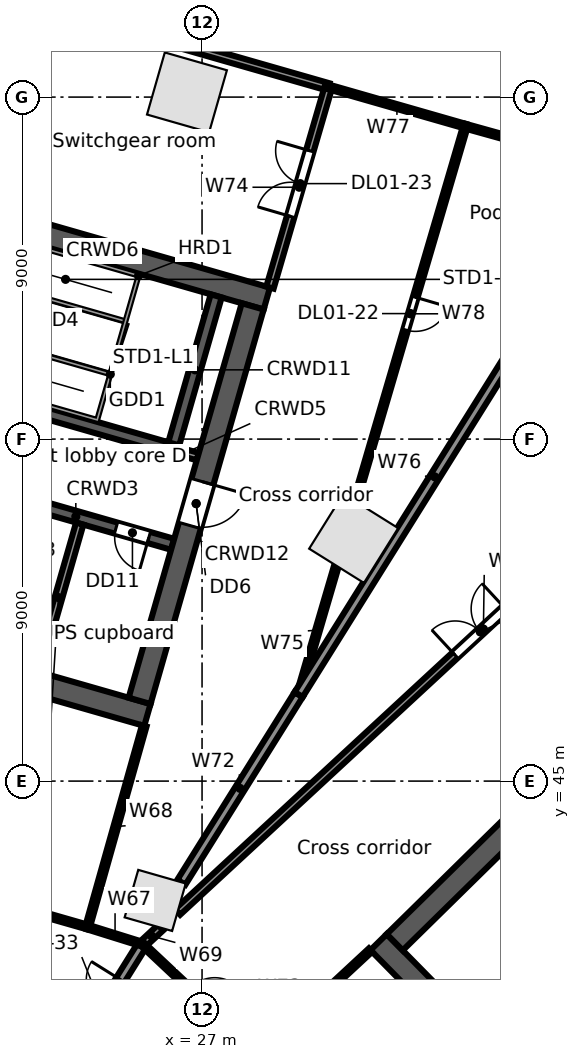
"""IFC4 building model, lengths in metres.
Left out: names, types, materials, properties, quantities, classifications, styles, units other than length and angle.
Written with IfcOpenShell. Run it as: python <this file> out.ifc"""

import sys

from ifc_helpers import new_model, si_unit, direction, frame, frame_2d, origin, origin_2d, place, context, subcontext, project, spatial, rectangle, extrude, element, fill, save


model = new_model("IFC4")
c1 = context("Model", 3, precision=1e-05, world=origin(), true_north=direction((0.0, 1.0)))
c2 = subcontext(c1, "Body", "Model", "MODEL_VIEW")
j1 = project(units=[si_unit("LENGTHUNIT", "METRE"), si_unit("PLANEANGLEUNIT", "RADIAN")], contexts=[c1])
p1 = place(None, origin())
s1 = spatial("IfcSite", under=j1, at=p1, CompositionType="ELEMENT")
p2 = place(p1, origin())
s2 = spatial("IfcBuilding", under=s1, at=p2, CompositionType="ELEMENT")
p3 = place(p2, frame((0.0, 0.0, 6.5)))
s3 = spatial("IfcBuildingStorey", under=s2, at=p3, CompositionType="ELEMENT", Elevation=6.5)
p4 = place(p3, frame((26.603, 63.124, 0.0), z_axis=(0.0, 0.0, 1.0), x_axis=(-0.961261695938, 0.275637355817, 0.0)))
e1 = element("IfcColumn", 1, at=p4, inside=s3, PredefinedType="COLUMN", context=c2, shape_type="SweptSolid", body=[
    extrude(rectangle(XDim=1.7, YDim=1.7, at=origin_2d()), origin(), (0.0, 0.0, 1.0), 5.0),
])
p5 = place(p3, frame((25.767, 41.86, 0.0), z_axis=(0.0, 0.0, 1.0), x_axis=(0.961261695938, -0.275637355817, 0.0)))
e2 = element("IfcColumn", 2, at=p5, inside=s3, PredefinedType="COLUMN", context=c2, shape_type="SweptSolid", body=[
    extrude(rectangle(XDim=1.3, YDim=1.3, at=origin_2d()), origin(), (0.0, 0.0, 1.0), 5.0),
])
p6 = place(p3, frame((30.99, 51.386, 0.0), z_axis=(0.0, 0.0, 1.0), x_axis=(0.529919264233, 0.848048096156, 0.0)))
e3 = element("IfcColumn", 3, at=p6, inside=s3, PredefinedType="COLUMN", context=c2, shape_type="SweptSolid", body=[
    extrude(rectangle(XDim=1.7, YDim=1.7, at=origin_2d()), origin(), (0.0, 0.0, 1.0), 5.0),
])
p7 = place(p3, frame((31.646, 40.763, 0.0), z_axis=(0.0, 0.0, 1.0), x_axis=(0.700911255944, -0.713248491965, 0.0)))
e4 = element("IfcWall", 4, at=p7, inside=s3, PredefinedType="SOLIDWALL", context=c2, shape_type="SweptSolid", body=[
    extrude(rectangle(XDim=15.0, YDim=0.6, at=frame_2d((7.5, 0.0))), origin(), (0.0, 0.0, 1.0), 4.65),
])
p8 = place(p7, frame((12.9, 0.0, 0.0)))
e5 = element("IfcOpeningElement", 5, at=p8, cuts=e4, PredefinedType="OPENING", context=c2, shape_type="SweptSolid", body=[
    extrude(rectangle(XDim=1.2, YDim=2.1, at=frame_2d((0.6, 1.05))), frame((0.0, 0.31, 0.0), z_axis=(0.0, -1.0, 0.0), x_axis=(1.0, 0.0, 0.0)), (0.0, 0.0, 1.0), 0.62),
])
p9 = place(p3, frame((32.07, 40.759, 0.0), z_axis=(0.0, 0.0, 1.0), x_axis=(0.713245344712, 0.70091445858, 0.0)))
e6 = element("IfcWall", 6, at=p9, inside=s3, PredefinedType="SOLIDWALL", context=c2, shape_type="SweptSolid", body=[
    extrude(rectangle(XDim=13.8, YDim=0.6, at=frame_2d((6.9, 0.0))), origin(), (0.0, 0.0, 1.0), 4.65),
])
p10 = place(p3, frame((34.593, 38.191, 0.0), z_axis=(0.0, 0.0, 1.0), x_axis=(0.713252216116, 0.700907466222, 0.0)))
e7 = element("IfcWall", 7, at=p10, inside=s3, PredefinedType="SOLIDWALL", context=c2, shape_type="SweptSolid", body=[
    extrude(rectangle(XDim=4.45, YDim=0.2, at=frame_2d((2.225, 0.0))), origin(), (0.0, 0.0, 1.0), 4.65),
])
p11 = place(p3, frame((16.911, 49.221, 0.0), z_axis=(0.0, 0.0, 1.0), x_axis=(0.96126248289, -0.275634611374, 0.0)))
e8 = element("IfcWall", 8, at=p11, inside=s3, PredefinedType="SOLIDWALL", context=c2, shape_type="SweptSolid", body=[
    extrude(rectangle(XDim=9.0, YDim=0.6, at=frame_2d((4.5, 0.0))), origin(), (0.0, 0.0, 1.0), 4.65),
])
p12 = place(p3, frame((21.131, 52.692, 0.0), z_axis=(0.0, 0.0, 1.0), x_axis=(0.961271492568, -0.275603188616, 0.0)))
e9 = element("IfcWall", 9, at=p12, inside=s3, PredefinedType="SOLIDWALL", context=c2, shape_type="SweptSolid", body=[
    extrude(rectangle(XDim=5.3, YDim=0.3, at=frame_2d((2.65, 0.0))), origin(), (0.0, 0.0, 1.0), 4.65),
])
p13 = place(p12, frame((0.95, 0.0, 0.0)))
e10 = element("IfcOpeningElement", 10, at=p13, cuts=e9, PredefinedType="OPENING", context=c2, shape_type="SweptSolid", body=[
    extrude(rectangle(XDim=0.9, YDim=2.1, at=frame_2d((0.45, 1.05))), frame((0.0, 0.16, 0.0), z_axis=(0.0, -1.0, 0.0), x_axis=(1.0, 0.0, 0.0)), (0.0, 0.0, 1.0), 0.32),
])
p14 = place(p12, frame((3.75, 0.0, 0.0)))
e11 = element("IfcOpeningElement", 11, at=p14, cuts=e9, PredefinedType="OPENING", context=c2, shape_type="SweptSolid", body=[
    extrude(rectangle(XDim=0.9, YDim=2.1, at=frame_2d((0.45, 1.05))), frame((0.0, 0.16, 0.0), z_axis=(0.0, -1.0, 0.0), x_axis=(1.0, 0.0, 0.0)), (0.0, 0.0, 1.0), 0.32),
])
p15 = place(p3, frame((19.389, 55.689, 0.0), z_axis=(0.0, 0.0, 1.0), x_axis=(0.961261397636, -0.275638396117, 0.0)))
e12 = element("IfcWall", 12, at=p15, inside=s3, PredefinedType="SOLIDWALL", context=c2, shape_type="SweptSolid", body=[
    extrude(rectangle(XDim=7.1, YDim=0.3, at=frame_2d((3.55, 0.0))), origin(), (0.0, 0.0, 1.0), 4.65),
])
p16 = place(p15, frame((0.2, 0.0, 0.0)))
e13 = element("IfcOpeningElement", 13, at=p16, cuts=e12, PredefinedType="OPENING", context=c2, shape_type="SweptSolid", body=[
    extrude(rectangle(XDim=1.0, YDim=2.1, at=frame_2d((0.5, 1.05))), frame((0.0, 0.16, 0.0), z_axis=(0.0, -1.0, 0.0), x_axis=(1.0, 0.0, 0.0)), (0.0, 0.0, 1.0), 0.32),
])
p17 = place(p3, frame((26.214, 53.732, 0.0), z_axis=(0.0, 0.0, 1.0), x_axis=(0.96122076476, -0.27578005982, 0.0)))
e14 = element("IfcWall", 14, at=p17, inside=s3, PredefinedType="SOLIDWALL", context=c2, shape_type="SweptSolid", body=[
    extrude(rectangle(XDim=0.7, YDim=0.2, at=frame_2d((0.35, 0.0))), origin(), (0.0, 0.0, 1.0), 4.65),
])
p18 = place(p3, frame((20.053, 60.18, 0.0), z_axis=(0.0, 0.0, 1.0), x_axis=(0.96126248289, -0.275634611374, 0.0)))
e15 = element("IfcWall", 15, at=p18, inside=s3, PredefinedType="SOLIDWALL", context=c2, shape_type="SweptSolid", body=[
    extrude(rectangle(XDim=9.0, YDim=0.6, at=frame_2d((4.5, 0.0))), origin(), (0.0, 0.0, 1.0), 4.65),
])
p19 = place(p3, frame((22.665, 47.883, 0.0), z_axis=(0.0, 0.0, 1.0), x_axis=(0.275596769212, 0.961273333033, 0.0)))
e16 = element("IfcWall", 16, at=p19, inside=s3, PredefinedType="PARTITIONING", context=c2, shape_type="SweptSolid", body=[
    extrude(rectangle(XDim=4.05, YDim=0.2, at=frame_2d((2.025, 0.0))), origin(), (0.0, 0.0, 1.0), 4.65),
])
p20 = place(p3, frame((26.256, 53.876, 0.0), z_axis=(0.0, 0.0, 1.0), x_axis=(0.275612739511, 0.961268754209, 0.0)))
e17 = element("IfcWall", 17, at=p20, inside=s3, PredefinedType="SOLIDWALL", context=c2, shape_type="SweptSolid", body=[
    extrude(rectangle(XDim=4.05, YDim=0.3, at=frame_2d((2.025, 0.0))), origin(), (0.0, 0.0, 1.0), 4.65),
])
p21 = place(p3, frame((25.356, 47.112, 0.0), z_axis=(0.0, 0.0, 1.0), x_axis=(0.275631631629, 0.961263337304, 0.0)))
e18 = element("IfcWall", 18, at=p21, inside=s3, PredefinedType="SOLIDWALL", context=c2, shape_type="SweptSolid", body=[
    extrude(rectangle(XDim=10.8, YDim=0.6, at=frame_2d((5.4, 0.0))), origin(), (0.0, 0.0, 1.0), 4.65),
])
p22 = place(p21, frame((4.8, 0.0, 0.0)))
e19 = element("IfcOpeningElement", 19, at=p22, cuts=e18, PredefinedType="OPENING", context=c2, shape_type="SweptSolid", body=[
    extrude(rectangle(XDim=1.2, YDim=2.1, at=frame_2d((0.6, 1.05))), frame((0.0, 0.31, 0.0), z_axis=(0.0, -1.0, 0.0), x_axis=(1.0, 0.0, 0.0)), (0.0, 0.0, 1.0), 0.62),
])
p23 = place(p3, frame((15.335, 43.639, 0.0), z_axis=(0.0, 0.0, 1.0), x_axis=(0.961281982754, -0.275566597455, 0.0)))
e20 = element("IfcWall", 20, at=p23, inside=s3, PredefinedType="PARTITIONING", context=c2, shape_type="SweptSolid", body=[
    extrude(rectangle(XDim=9.0, YDim=0.125, at=frame_2d((4.5, 0.0))), origin(), (0.0, 0.0, 1.0), 3.822),
])
p24 = place(p23, frame((3.95, 0.0, 0.0)))
e21 = element("IfcOpeningElement", 21, at=p24, cuts=e20, PredefinedType="OPENING", context=c2, shape_type="SweptSolid", body=[
    extrude(rectangle(XDim=0.9, YDim=2.1, at=frame_2d((0.45, 1.05))), frame((0.0, 0.073, 0.0), z_axis=(0.0, -1.0, 0.0), x_axis=(1.0, 0.0, 0.0)), (0.0, 0.0, 1.0), 0.145),
])
p25 = place(p3, frame((21.674, 65.749, 0.0), z_axis=(0.0, 0.0, 1.0), x_axis=(0.961259417468, -0.275645301662, 0.0)))
e22 = element("IfcWall", 22, at=p25, inside=s3, PredefinedType="PARTITIONING", context=c2, shape_type="SweptSolid", body=[
    extrude(rectangle(XDim=9.0, YDim=0.2, at=frame_2d((4.5, 0.0))), origin(), (0.0, 0.0, 1.0), 3.822),
])
p26 = place(p3, frame((23.397, 37.442, 0.0), z_axis=(0.0, 0.0, 1.0), x_axis=(0.529805058875, 0.848119448893, 0.0)))
e23 = element("IfcWall", 23, at=p26, inside=s3, PredefinedType="PARTITIONING", context=c2, shape_type="SweptSolid", body=[
    extrude(rectangle(XDim=3.849, YDim=0.25, at=frame_2d((1.924, 0.0))), origin(), (0.0, 0.0, 1.0), 3.712),
])
p27 = place(p26, frame((0.95, 0.0, 0.0)))
e24 = element("IfcOpeningElement", 24, at=p27, cuts=e23, PredefinedType="OPENING", context=c2, shape_type="SweptSolid", body=[
    extrude(rectangle(XDim=1.8, YDim=2.1, at=frame_2d((0.9, 1.05))), frame((0.0, 0.135, 0.0), z_axis=(0.0, -1.0, 0.0), x_axis=(1.0, 0.0, 0.0)), (0.0, 0.0, 1.0), 0.27),
])
p28 = place(p3, frame((23.986, 41.159, 0.0), z_axis=(0.0, 0.0, 1.0), x_axis=(0.954522865266, -0.298137719325, 0.0)))
e25 = element("IfcWall", 25, at=p28, inside=s3, PredefinedType="PARTITIONING", context=c2, shape_type="SweptSolid", body=[
    extrude(rectangle(XDim=1.519, YDim=0.125, at=frame_2d((0.76, 0.0))), origin(), (0.0, 0.0, 1.0), 3.712),
])
p29 = place(p3, frame((23.986, 41.159, 0.0), z_axis=(0.0, 0.0, 1.0), x_axis=(0.271465437068, 0.962448188983, 0.0)))
e26 = element("IfcWall", 26, at=p29, inside=s3, PredefinedType="PARTITIONING", context=c2, shape_type="SweptSolid", body=[
    extrude(rectangle(XDim=5.5, YDim=0.125, at=frame_2d((2.75, 0.0))), origin(), (0.0, 0.0, 1.0), 3.93),
])
p30 = place(p3, frame((25.436, 40.706, 0.0), z_axis=(0.0, 0.0, 1.0), x_axis=(0.733725630695, 0.679445876329, 0.0)))
e27 = element("IfcWall", 27, at=p30, inside=s3, PredefinedType="PARTITIONING", context=c2, shape_type="SweptSolid", body=[
    extrude(rectangle(XDim=0.643, YDim=0.2, at=frame_2d((0.322, 0.0))), origin(), (0.0, 0.0, 1.0), 4.65),
])
p31 = place(p3, frame((25.436, 40.706, 0.0), z_axis=(0.0, 0.0, 1.0), x_axis=(0.729011488135, -0.684501461041, 0.0)))
e28 = element("IfcWall", 28, at=p31, inside=s3, PredefinedType="PARTITIONING", context=c2, shape_type="SweptSolid", body=[
    extrude(rectangle(XDim=4.202, YDim=0.125, at=frame_2d((2.101, 0.0))), origin(), (0.0, 0.0, 1.0), 4.65),
])
p32 = place(p31, frame((1.7, 0.0, 0.0)))
e29 = element("IfcOpeningElement", 29, at=p32, cuts=e28, PredefinedType="OPENING", context=c2, shape_type="SweptSolid", body=[
    extrude(rectangle(XDim=0.9, YDim=2.1, at=frame_2d((0.45, 1.05))), frame((0.0, 0.073, 0.0), z_axis=(0.0, -1.0, 0.0), x_axis=(1.0, 0.0, 0.0)), (0.0, 0.0, 1.0), 0.145),
])
p33 = place(p3, frame((26.356, 41.557, 0.0), z_axis=(0.0, 0.0, 1.0), x_axis=(0.734047402287, 0.679098233834, 0.0)))
e30 = element("IfcWall", 30, at=p33, inside=s3, PredefinedType="PARTITIONING", context=c2, shape_type="SweptSolid", body=[
    extrude(rectangle(XDim=21.926, YDim=0.2, at=frame_2d((10.963, 0.0))), origin(), (0.0, 0.0, 1.0), 3.73),
])
p34 = place(p33, frame((9.95, 0.0, 0.0)))
e31 = element("IfcOpeningElement", 31, at=p34, cuts=e30, PredefinedType="OPENING", context=c2, shape_type="SweptSolid", body=[
    extrude(rectangle(XDim=1.8, YDim=2.1, at=frame_2d((0.9, 1.05))), frame((0.0, 0.11, 0.0), z_axis=(0.0, -1.0, 0.0), x_axis=(1.0, 0.0, 0.0)), (0.0, 0.0, 1.0), 0.22),
])
p35 = place(p3, frame((26.456, 42.338, 0.0), z_axis=(0.0, 0.0, 1.0), x_axis=(0.529836963461, 0.848099517834, 0.0)))
e32 = element("IfcWall", 32, at=p35, inside=s3, PredefinedType="PARTITIONING", context=c2, shape_type="SweptSolid", body=[
    extrude(rectangle(XDim=5.826, YDim=0.25, at=frame_2d((2.913, 0.0))), origin(), (0.0, 0.0, 1.0), 3.712),
])
p36 = place(p3, frame((28.499, 37.83, 0.0), z_axis=(0.0, 0.0, 1.0), x_axis=(0.732973836409, 0.680256830278, 0.0)))
e33 = element("IfcWall", 33, at=p36, inside=s3, PredefinedType="PARTITIONING", context=c2, shape_type="SweptSolid", body=[
    extrude(rectangle(XDim=4.001, YDim=0.125, at=frame_2d((2.0, 0.0))), origin(), (0.0, 0.0, 1.0), 3.93),
])
p37 = place(p3, frame((28.787, 57.987, 0.0), z_axis=(0.0, 0.0, 1.0), x_axis=(0.279752860161, 0.960072047938, 0.0)))
e34 = element("IfcWall", 34, at=p37, inside=s3, PredefinedType="PARTITIONING", context=c2, shape_type="SweptSolid", body=[
    extrude(rectangle(XDim=5.501, YDim=0.2, at=frame_2d((2.75, 0.0))), origin(), (0.0, 0.0, 1.0), 3.922),
])
p38 = place(p37, frame((1.95, 0.0, 0.0)))
e35 = element("IfcOpeningElement", 35, at=p38, cuts=e34, PredefinedType="OPENING", context=c2, shape_type="SweptSolid", body=[
    extrude(rectangle(XDim=1.8, YDim=2.1, at=frame_2d((0.9, 1.05))), frame((0.0, 0.11, 0.0), z_axis=(0.0, -1.0, 0.0), x_axis=(1.0, 0.0, 0.0)), (0.0, 0.0, 1.0), 0.22),
])
p39 = place(p3, frame((29.543, 47.279, 0.0), z_axis=(0.0, 0.0, 1.0), x_axis=(0.28156355079, 0.959542582102, 0.0)))
e36 = element("IfcWall", 36, at=p39, inside=s3, PredefinedType="PARTITIONING", context=c2, shape_type="SweptSolid", body=[
    extrude(rectangle(XDim=3.531, YDim=0.125, at=frame_2d((1.765, 0.0))), origin(), (0.0, 0.0, 1.0), 3.712),
])
p40 = place(p3, frame((29.543, 47.279, 0.0), z_axis=(0.0, 0.0, 1.0), x_axis=(0.529929076845, 0.848041964477, 0.0)))
e37 = element("IfcWall", 37, at=p40, inside=s3, PredefinedType="PARTITIONING", context=c2, shape_type="SweptSolid", body=[
    extrude(rectangle(XDim=13.507, YDim=0.25, at=frame_2d((6.754, 0.0))), origin(), (0.0, 0.0, 1.0), 3.73),
])
p41 = place(p3, frame((30.326, 63.268, 0.0), z_axis=(0.0, 0.0, 1.0), x_axis=(0.96120880595, -0.275821738383, 0.0)))
e38 = element("IfcWall", 38, at=p41, inside=s3, PredefinedType="PARTITIONING", context=c2, shape_type="SweptSolid", body=[
    extrude(rectangle(XDim=3.75, YDim=0.125, at=frame_2d((1.875, 0.0))), origin(), (0.0, 0.0, 1.0), 4.65),
])
p42 = place(p3, frame((31.034, 52.361, 0.0), z_axis=(0.0, 0.0, 1.0), x_axis=(0.281471237406, 0.959569665273, 0.0)))
e39 = element("IfcWall", 39, at=p42, inside=s3, PredefinedType="PARTITIONING", context=c2, shape_type="SweptSolid", body=[
    extrude(rectangle(XDim=10.289, YDim=0.125, at=frame_2d((5.145, 0.0))), origin(), (0.0, 0.0, 1.0), 3.922),
])
p43 = place(p42, frame((4.7, 0.0, 0.0)))
e40 = element("IfcOpeningElement", 40, at=p43, cuts=e39, PredefinedType="OPENING", context=c2, shape_type="SweptSolid", body=[
    extrude(rectangle(XDim=0.9, YDim=2.1, at=frame_2d((0.45, 1.05))), frame((0.0, 0.073, 0.0), z_axis=(0.0, -1.0, 0.0), x_axis=(1.0, 0.0, 0.0)), (0.0, 0.0, 1.0), 0.145),
])
p44 = place(p3, frame((33.93, 62.234, 0.0), z_axis=(0.0, 0.0, 1.0), x_axis=(0.963433299433, -0.267948274007, 0.0)))
e41 = element("IfcWall", 41, at=p44, inside=s3, PredefinedType="PARTITIONING", context=c2, shape_type="SweptSolid", body=[
    extrude(rectangle(XDim=4.385, YDim=0.125, at=frame_2d((2.192, 0.0))), origin(), (0.0, 0.0, 1.0), 4.018),
])
p45 = place(p22, frame((1.2, 0.0, 0.0), z_axis=(0.0, 0.0, 1.0), x_axis=(-1.0, 0.0, 0.0)))
e42 = element("IfcDoor", 42, at=p45, inside=s3, OperationType="SINGLE_SWING_LEFT", PredefinedType="DOOR", context=c2, shape_type="SweptSolid", body=[
    extrude(rectangle(XDim=1.2, YDim=2.1, at=frame_2d((0.6, 1.05))), frame((0.0, 0.025, 0.0), z_axis=(0.0, -1.0, 0.0), x_axis=(1.0, 0.0, 0.0)), (0.0, 0.0, 1.0), 0.05),
])
fill(e19, e42)
p46 = place(p14, frame((0.9, 0.0, 0.0), z_axis=(0.0, 0.0, 1.0), x_axis=(-1.0, 0.0, 0.0)))
e43 = element("IfcDoor", 43, at=p46, inside=s3, OperationType="SINGLE_SWING_LEFT", PredefinedType="DOOR", context=c2, shape_type="SweptSolid", body=[
    extrude(rectangle(XDim=0.9, YDim=2.1, at=frame_2d((0.45, 1.05))), frame((0.0, 0.025, 0.0), z_axis=(0.0, -1.0, 0.0), x_axis=(1.0, 0.0, 0.0)), (0.0, 0.0, 1.0), 0.05),
])
fill(e11, e43)
p47 = place(p43, frame((0.9, 0.0, 0.0), z_axis=(0.0, 0.0, 1.0), x_axis=(-1.0, 0.0, 0.0)))
e44 = element("IfcDoor", 44, at=p47, inside=s3, OperationType="SINGLE_SWING_LEFT", PredefinedType="DOOR", context=c2, shape_type="SweptSolid", body=[
    extrude(rectangle(XDim=0.9, YDim=2.1, at=frame_2d((0.45, 1.05))), frame((0.0, 0.025, 0.0), z_axis=(0.0, -1.0, 0.0), x_axis=(1.0, 0.0, 0.0)), (0.0, 0.0, 1.0), 0.05),
])
fill(e40, e44)
p48 = place(p38, origin())
e45 = element("IfcDoor", 45, at=p48, inside=s3, OperationType="DOUBLE_DOOR_SINGLE_SWING", PredefinedType="DOOR", context=c2, shape_type="SweptSolid", body=[
    extrude(rectangle(XDim=1.8, YDim=2.1, at=frame_2d((0.9, 1.05))), frame((0.0, 0.025, 0.0), z_axis=(0.0, -1.0, 0.0), x_axis=(1.0, 0.0, 0.0)), (0.0, 0.0, 1.0), 0.05),
])
fill(e35, e45)
p49 = place(p34, origin())
e46 = element("IfcDoor", 46, at=p49, inside=s3, OperationType="DOUBLE_DOOR_SINGLE_SWING", PredefinedType="DOOR", context=c2, shape_type="SweptSolid", body=[
    extrude(rectangle(XDim=1.8, YDim=2.1, at=frame_2d((0.9, 1.05))), frame((0.0, 0.025, 0.0), z_axis=(0.0, -1.0, 0.0), x_axis=(1.0, 0.0, 0.0)), (0.0, 0.0, 1.0), 0.05),
])
fill(e31, e46)
save(model, sys.argv[1])
